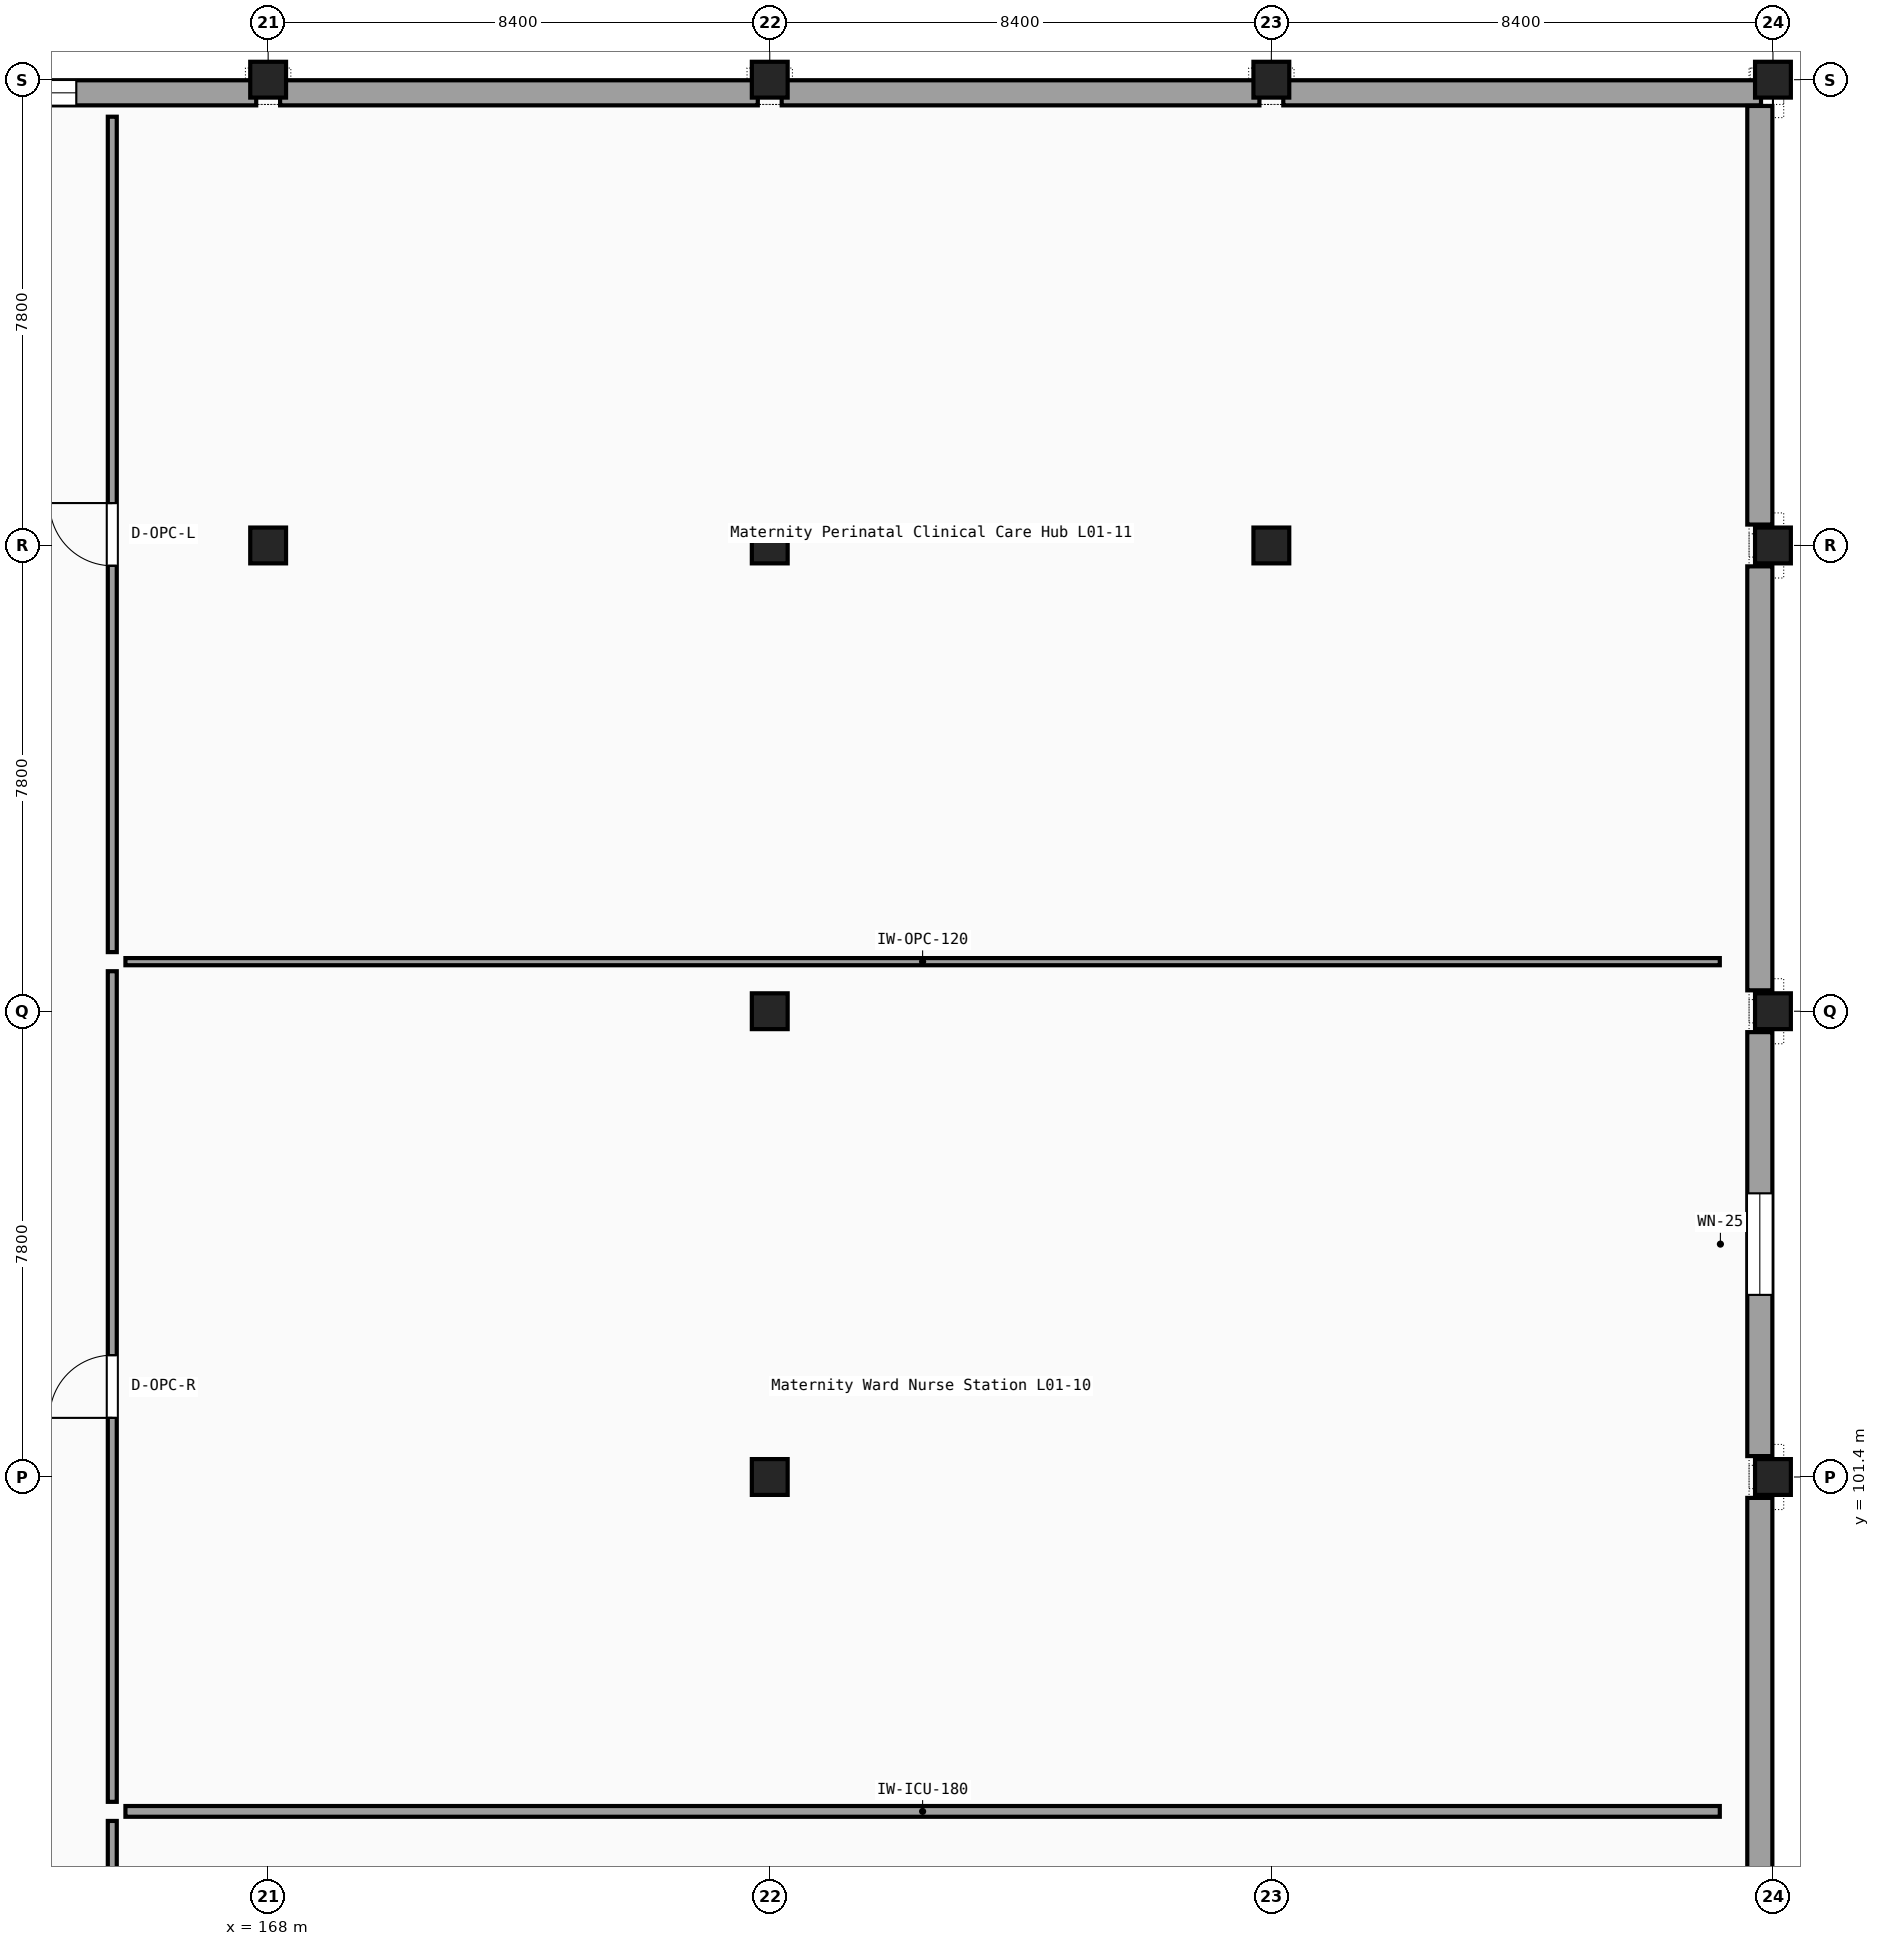
"""IFC4 building model, lengths in metres.
Left out: names, types, materials, properties, quantities, classifications, styles, units other than length and angle.
Written with IfcOpenShell. Run it as: python <this file> out.ifc"""

import sys

from ifc_helpers import new_model, si_unit, direction, frame, frame_2d, origin, origin_2d, place, context, subcontext, project, spatial, rectangle, i_section, extrude, element, fill, save


model = new_model("IFC4")
c1 = context("Model", 3, precision=1e-05, world=origin(), true_north=direction((0.0, 1.0)))
c2 = subcontext(c1, "Body", "Model", "MODEL_VIEW")
j1 = project(units=[si_unit("LENGTHUNIT", "METRE"), si_unit("PLANEANGLEUNIT", "RADIAN")], contexts=[c1])
p1 = place(None, origin())
s1 = spatial("IfcSite", under=j1, at=p1, CompositionType="ELEMENT")
p2 = place(p1, origin())
s2 = spatial("IfcBuilding", under=s1, at=p2, CompositionType="ELEMENT")
p3 = place(p2, frame((0.0, 0.0, 5.1)))
s3 = spatial("IfcBuildingStorey", under=s2, at=p3, CompositionType="ELEMENT", Elevation=5.1)
for number, where, z_axis, x_axis in (
    (1, (168.0, 117.0, 0.0), (0.0, 0.0, 1.0), (1.0, 0.0, 0.0)),
    (2, (168.0, 124.8, 0.0), (0.0, 0.0, 1.0), (1.0, 0.0, 0.0)),
    (3, (176.4, 101.4, 0.0), (0.0, 0.0, 1.0), (1.0, 0.0, 0.0)),
    (4, (176.4, 109.2, 0.0), (0.0, 0.0, 1.0), (1.0, 0.0, 0.0)),
    (5, (176.4, 117.0, 0.0), (0.0, 0.0, 1.0), (1.0, 0.0, 0.0)),
    (6, (176.4, 124.8, 0.0), (0.0, 0.0, 1.0), (1.0, 0.0, 0.0)),
    (7, (184.8, 117.0, 0.0), (0.0, 0.0, 1.0), (1.0, 0.0, 0.0)),
    (8, (184.8, 124.8, 0.0), (0.0, 0.0, 1.0), (1.0, 0.0, 0.0)),
    (9, (193.2, 101.4, 0.0), (0.0, 0.0, 1.0), (1.0, 0.0, 0.0)),
    (10, (193.2, 109.2, 0.0), (0.0, 0.0, 1.0), (1.0, 0.0, 0.0)),
    (11, (193.2, 117.0, 0.0), (0.0, 0.0, 1.0), (1.0, 0.0, 0.0)),
    (12, (193.2, 124.8, 0.0), (0.0, 0.0, 1.0), (1.0, 0.0, 0.0)),
):
    element("IfcColumn", number, at=place(p3, frame(where, z_axis=z_axis, x_axis=x_axis)), inside=s3, PredefinedType="COLUMN", context=c2, shape_type="SweptSolid", body=[
        extrude(i_section(OverallWidth=0.3, OverallDepth=0.6, WebThickness=0.015, FlangeThickness=0.03, FilletRadius=0.027, at=origin_2d()), origin(), (0.0, 0.0, 1.0), 5.1),
    ])
p4 = place(p3, frame((160.025, 124.58, 0.0), z_axis=(0.0, 0.0, 1.0), x_axis=(1.0, 0.0, 0.0)))
e13 = element("IfcWall", 13, at=p4, inside=s3, PredefinedType="SOLIDWALL", context=c2, shape_type="SweptSolid", body=[
    extrude(rectangle(XDim=7.775, YDim=0.42, at=frame_2d((3.888, 0.0))), origin(), (0.0, 0.0, 1.0), 4.38),
])
p5 = place(p4, frame((3.012, 0.0, 0.75)))
e14 = element("IfcOpeningElement", 14, at=p5, cuts=e13, PredefinedType="OPENING", context=c2, shape_type="SweptSolid", body=[
    extrude(rectangle(XDim=1.75, YDim=1.9, at=frame_2d((0.875, 0.95))), frame((0.0, 0.22, 0.0), z_axis=(0.0, -1.0, 0.0), x_axis=(1.0, 0.0, 0.0)), (0.0, 0.0, 1.0), 0.44),
])
for number, where, z_axis, x_axis in (
    (15, (168.2, 124.58, 0.0), (0.0, 0.0, 1.0), (1.0, 0.0, 0.0)),
    (16, (176.6, 124.58, 0.0), (0.0, 0.0, 1.0), (1.0, 0.0, 0.0)),
    (17, (185.0, 124.58, 0.0), (0.0, 0.0, 1.0), (1.0, 0.0, 0.0)),
):
    element("IfcWall", number, at=place(p3, frame(where, z_axis=z_axis, x_axis=x_axis)), inside=s3, PredefinedType="SOLIDWALL", context=c2, shape_type="SweptSolid", body=[
        extrude(rectangle(XDim=8.0, YDim=0.42, at=frame_2d((4.0, 0.0))), origin(), (0.0, 0.0, 1.0), 4.38),
    ])
p6 = place(p3, frame((192.98, 93.95, 0.0), z_axis=(0.0, 0.0, 1.0), x_axis=(0.0, 1.0, 0.0)))
e18 = element("IfcWall", 18, at=p6, inside=s3, PredefinedType="SOLIDWALL", context=c2, shape_type="SweptSolid", body=[
    extrude(rectangle(XDim=7.1, YDim=0.42, at=frame_2d((3.55, 0.0))), origin(), (0.0, 0.0, 1.0), 4.33),
])
p7 = place(p3, frame((192.98, 101.75, 0.0), z_axis=(0.0, 0.0, 1.0), x_axis=(0.0, 1.0, 0.0)))
e19 = element("IfcWall", 19, at=p7, inside=s3, PredefinedType="SOLIDWALL", context=c2, shape_type="SweptSolid", body=[
    extrude(rectangle(XDim=7.1, YDim=0.42, at=frame_2d((3.55, 0.0))), origin(), (0.0, 0.0, 1.0), 4.33),
])
p8 = place(p7, frame((2.7, 0.0, 0.95)))
e20 = element("IfcOpeningElement", 20, at=p8, cuts=e19, PredefinedType="OPENING", context=c2, shape_type="SweptSolid", body=[
    extrude(rectangle(XDim=1.7, YDim=1.55, at=frame_2d((0.85, 0.775))), frame((0.0, 0.22, 0.0), z_axis=(0.0, -1.0, 0.0), x_axis=(1.0, 0.0, 0.0)), (0.0, 0.0, 1.0), 0.44),
])
p9 = place(p3, frame((192.98, 109.55, 0.0), z_axis=(0.0, 0.0, 1.0), x_axis=(0.0, 1.0, 0.0)))
e21 = element("IfcWall", 21, at=p9, inside=s3, PredefinedType="SOLIDWALL", context=c2, shape_type="SweptSolid", body=[
    extrude(rectangle(XDim=7.1, YDim=0.42, at=frame_2d((3.55, 0.0))), origin(), (0.0, 0.0, 1.0), 4.33),
])
p10 = place(p3, frame((192.98, 117.35, 0.0), z_axis=(0.0, 0.0, 1.0), x_axis=(0.0, 1.0, 0.0)))
e22 = element("IfcWall", 22, at=p10, inside=s3, PredefinedType="SOLIDWALL", context=c2, shape_type="SweptSolid", body=[
    extrude(rectangle(XDim=7.01, YDim=0.42, at=frame_2d((3.505, 0.0))), origin(), (0.0, 0.0, 1.0), 4.33),
])
p11 = place(p3, frame((165.39, 81.65, 0.0), z_axis=(0.0, 0.0, 1.0), x_axis=(0.0, 1.0, 0.0)))
e23 = element("IfcWall", 23, at=p11, inside=s3, PredefinedType="PARTITIONING", context=c2, shape_type="SweptSolid", body=[
    extrude(rectangle(XDim=13.99, YDim=0.15, at=frame_2d((6.995, 0.0))), origin(), (0.0, 0.0, 1.0), 4.33),
])
p12 = place(p11, frame((6.145, 0.0, 0.0)))
e24 = element("IfcOpeningElement", 24, at=p12, cuts=e23, PredefinedType="OPENING", context=c2, shape_type="SweptSolid", body=[
    extrude(rectangle(XDim=1.7, YDim=2.3, at=frame_2d((0.85, 1.15))), frame((0.0, 0.085, 0.0), z_axis=(0.0, -1.0, 0.0), x_axis=(1.0, 0.0, 0.0)), (0.0, 0.0, 1.0), 0.17),
])
p13 = place(p3, frame((165.61, 95.8, 0.0), z_axis=(0.0, 0.0, 1.0), x_axis=(1.0, 0.0, 0.0)))
e25 = element("IfcWall", 25, at=p13, inside=s3, PredefinedType="PARTITIONING", context=c2, shape_type="SweptSolid", body=[
    extrude(rectangle(XDim=26.7, YDim=0.18, at=frame_2d((13.35, 0.0))), origin(), (0.0, 0.0, 1.0), 4.38),
])
p14 = place(p3, frame((165.39, 95.96, 0.0), z_axis=(0.0, 0.0, 1.0), x_axis=(0.0, 1.0, 0.0)))
e26 = element("IfcWall", 26, at=p14, inside=s3, PredefinedType="PARTITIONING", context=c2, shape_type="SweptSolid", body=[
    extrude(rectangle(XDim=13.91, YDim=0.15, at=frame_2d((6.955, 0.0))), origin(), (0.0, 0.0, 1.0), 4.33),
])
p15 = place(p14, frame((6.43, 0.0, 0.0)))
e27 = element("IfcOpeningElement", 27, at=p15, cuts=e26, PredefinedType="OPENING", context=c2, shape_type="SweptSolid", body=[
    extrude(rectangle(XDim=1.05, YDim=2.15, at=frame_2d((0.525, 1.075))), frame((0.0, 0.085, 0.0), z_axis=(0.0, -1.0, 0.0), x_axis=(1.0, 0.0, 0.0)), (0.0, 0.0, 1.0), 0.17),
])
p16 = place(p3, frame((165.61, 110.03, 0.0), z_axis=(0.0, 0.0, 1.0), x_axis=(1.0, 0.0, 0.0)))
e28 = element("IfcWall", 28, at=p16, inside=s3, PredefinedType="PARTITIONING", context=c2, shape_type="SweptSolid", body=[
    extrude(rectangle(XDim=26.7, YDim=0.12, at=frame_2d((13.35, 0.0))), origin(), (0.0, 0.0, 1.0), 4.38),
])
p17 = place(p3, frame((165.39, 110.19, 0.0), z_axis=(0.0, 0.0, 1.0), x_axis=(0.0, 1.0, 0.0)))
e29 = element("IfcWall", 29, at=p17, inside=s3, PredefinedType="PARTITIONING", context=c2, shape_type="SweptSolid", body=[
    extrude(rectangle(XDim=13.99, YDim=0.15, at=frame_2d((6.995, 0.0))), origin(), (0.0, 0.0, 1.0), 4.33),
])
p18 = place(p17, frame((6.47, 0.0, 0.0)))
e30 = element("IfcOpeningElement", 30, at=p18, cuts=e29, PredefinedType="OPENING", context=c2, shape_type="SweptSolid", body=[
    extrude(rectangle(XDim=1.05, YDim=2.15, at=frame_2d((0.525, 1.075))), frame((0.0, 0.085, 0.0), z_axis=(0.0, -1.0, 0.0), x_axis=(1.0, 0.0, 0.0)), (0.0, 0.0, 1.0), 0.17),
])
p19 = place(p5, origin())
e31 = element("IfcWindow", 31, at=p19, inside=s3, PartitioningType="SINGLE_PANEL", PredefinedType="WINDOW", context=c2, shape_type="SweptSolid", body=[
    extrude(rectangle(XDim=1.75, YDim=1.9, at=frame_2d((0.875, 0.95))), frame((0.0, 0.03, 0.0), z_axis=(0.0, -1.0, 0.0), x_axis=(1.0, 0.0, 0.0)), (0.0, 0.0, 1.0), 0.06),
])
fill(e14, e31)
p20 = place(p8, origin())
e32 = element("IfcWindow", 32, at=p20, inside=s3, PartitioningType="SINGLE_PANEL", PredefinedType="WINDOW", context=c2, shape_type="SweptSolid", body=[
    extrude(rectangle(XDim=1.7, YDim=1.55, at=frame_2d((0.85, 0.775))), frame((0.0, 0.03, 0.0), z_axis=(0.0, -1.0, 0.0), x_axis=(1.0, 0.0, 0.0)), (0.0, 0.0, 1.0), 0.06),
])
fill(e20, e32)
p21 = place(p15, origin())
e33 = element("IfcDoor", 33, at=p21, inside=s3, OperationType="SINGLE_SWING_LEFT", PredefinedType="DOOR", context=c2, shape_type="SweptSolid", body=[
    extrude(rectangle(XDim=1.05, YDim=2.15, at=frame_2d((0.525, 1.075))), frame((0.0, 0.025, 0.0), z_axis=(0.0, -1.0, 0.0), x_axis=(1.0, 0.0, 0.0)), (0.0, 0.0, 1.0), 0.05),
])
fill(e27, e33)
p22 = place(p18, origin())
e34 = element("IfcDoor", 34, at=p22, inside=s3, OperationType="SINGLE_SWING_RIGHT", PredefinedType="DOOR", context=c2, shape_type="SweptSolid", body=[
    extrude(rectangle(XDim=1.05, YDim=2.15, at=frame_2d((0.525, 1.075))), frame((0.0, 0.025, 0.0), z_axis=(0.0, -1.0, 0.0), x_axis=(1.0, 0.0, 0.0)), (0.0, 0.0, 1.0), 0.05),
])
fill(e30, e34)
save(model, sys.argv[1])
